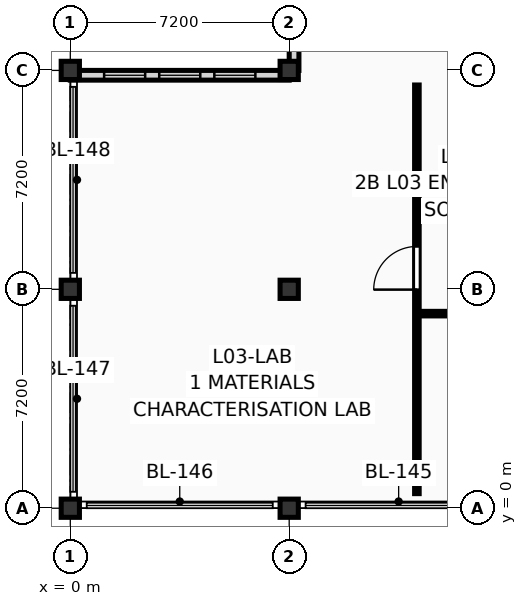
"""IFC4 building model, lengths in metres.
Left out: names, types, materials, properties, quantities, classifications, styles, units other than length and angle.
Written with IfcOpenShell. Run it as: python <this file> out.ifc"""

import sys

from ifc_helpers import new_model, si_unit, direction, frame, frame_2d, origin, origin_2d, place, context, subcontext, project, spatial, rectangle, extrude, element, fill, save


model = new_model("IFC4")
c1 = context("Model", 3, precision=1e-05, world=origin(), true_north=direction((0.0, 1.0)))
c2 = subcontext(c1, "Body", "Model", "MODEL_VIEW")
j1 = project(units=[si_unit("LENGTHUNIT", "METRE"), si_unit("PLANEANGLEUNIT", "RADIAN")], contexts=[c1])
p1 = place(None, origin())
s1 = spatial("IfcSite", under=j1, at=p1, CompositionType="ELEMENT")
p2 = place(p1, origin())
s2 = spatial("IfcBuilding", under=s1, at=p2, CompositionType="ELEMENT")
p3 = place(p2, frame((0.0, 0.0, 12.15)))
s3 = spatial("IfcBuildingStorey", under=s2, at=p3, CompositionType="ELEMENT", Elevation=12.15)
for number, where, z_axis, x_axis in (
    (1, (0.0, 0.0, 0.0), (0.0, 0.0, 1.0), (1.0, 0.0, 0.0)),
    (2, (0.0, 7.2, 0.0), (0.0, 0.0, 1.0), (1.0, 0.0, 0.0)),
    (3, (0.0, 14.4, 0.0), (0.0, 0.0, 1.0), (1.0, 0.0, 0.0)),
    (4, (7.2, 0.0, 0.0), (0.0, 0.0, 1.0), (1.0, 0.0, 0.0)),
    (5, (7.2, 7.2, 0.0), (0.0, 0.0, 1.0), (1.0, 0.0, 0.0)),
    (6, (7.2, 14.4, 0.0), (0.0, 0.0, 1.0), (1.0, 0.0, 0.0)),
):
    element("IfcColumn", number, at=place(p3, frame(where, z_axis=z_axis, x_axis=x_axis)), inside=s3, PredefinedType="COLUMN", context=c2, shape_type="SweptSolid", body=[
        extrude(rectangle(XDim=0.6, YDim=0.6, at=origin_2d()), origin(), (0.0, 0.0, 1.0), 3.6),
    ])
p4 = place(p3, frame((7.36, 14.4, 0.0), z_axis=(0.0, 0.0, 1.0), x_axis=(0.0, 1.0, 0.0)))
e7 = element("IfcWall", 7, at=p4, inside=s3, PredefinedType="SOLIDWALL", context=c2, shape_type="SweptSolid", body=[
    extrude(rectangle(XDim=7.2, YDim=0.32, at=frame_2d((3.6, 0.0))), origin(), (0.0, 0.0, 1.0), 2.84),
])
p5 = place(p4, frame((1.113, 0.0, 0.18)))
e8 = element("IfcOpeningElement", 8, at=p5, cuts=e7, PredefinedType="OPENING", context=c2, shape_type="SweptSolid", body=[
    extrude(rectangle(XDim=1.35, YDim=2.45, at=frame_2d((0.675, 1.225))), frame((0.0, 0.172, 0.0), z_axis=(0.0, -1.0, 0.0), x_axis=(1.0, 0.0, 0.0)), (0.0, 0.0, 1.0), 0.344),
])
p6 = place(p4, frame((2.925, 0.0, 0.18)))
e9 = element("IfcOpeningElement", 9, at=p6, cuts=e7, PredefinedType="OPENING", context=c2, shape_type="SweptSolid", body=[
    extrude(rectangle(XDim=1.35, YDim=2.45, at=frame_2d((0.675, 1.225))), frame((0.0, 0.172, 0.0), z_axis=(0.0, -1.0, 0.0), x_axis=(1.0, 0.0, 0.0)), (0.0, 0.0, 1.0), 0.344),
])
p7 = place(p4, frame((4.738, 0.0, 0.18)))
e10 = element("IfcOpeningElement", 10, at=p7, cuts=e7, PredefinedType="OPENING", context=c2, shape_type="SweptSolid", body=[
    extrude(rectangle(XDim=1.35, YDim=2.45, at=frame_2d((0.675, 1.225))), frame((0.0, 0.172, 0.0), z_axis=(0.0, -1.0, 0.0), x_axis=(1.0, 0.0, 0.0)), (0.0, 0.0, 1.0), 0.344),
])
p8 = place(p3, frame((0.0, 14.24, 0.0), z_axis=(0.0, 0.0, 1.0), x_axis=(1.0, 0.0, 0.0)))
e11 = element("IfcWall", 11, at=p8, inside=s3, PredefinedType="SOLIDWALL", context=c2, shape_type="SweptSolid", body=[
    extrude(rectangle(XDim=7.2, YDim=0.32, at=frame_2d((3.6, 0.0))), origin(), (0.0, 0.0, 1.0), 2.84),
])
p9 = place(p8, frame((1.113, 0.0, 0.18)))
e12 = element("IfcOpeningElement", 12, at=p9, cuts=e11, PredefinedType="OPENING", context=c2, shape_type="SweptSolid", body=[
    extrude(rectangle(XDim=1.35, YDim=2.45, at=frame_2d((0.675, 1.225))), frame((0.0, 0.172, 0.0), z_axis=(0.0, -1.0, 0.0), x_axis=(1.0, 0.0, 0.0)), (0.0, 0.0, 1.0), 0.344),
])
p10 = place(p8, frame((2.925, 0.0, 0.18)))
e13 = element("IfcOpeningElement", 13, at=p10, cuts=e11, PredefinedType="OPENING", context=c2, shape_type="SweptSolid", body=[
    extrude(rectangle(XDim=1.35, YDim=2.45, at=frame_2d((0.675, 1.225))), frame((0.0, 0.172, 0.0), z_axis=(0.0, -1.0, 0.0), x_axis=(1.0, 0.0, 0.0)), (0.0, 0.0, 1.0), 0.344),
])
p11 = place(p8, frame((4.738, 0.0, 0.18)))
e14 = element("IfcOpeningElement", 14, at=p11, cuts=e11, PredefinedType="OPENING", context=c2, shape_type="SweptSolid", body=[
    extrude(rectangle(XDim=1.35, YDim=2.45, at=frame_2d((0.675, 1.225))), frame((0.0, 0.172, 0.0), z_axis=(0.0, -1.0, 0.0), x_axis=(1.0, 0.0, 0.0)), (0.0, 0.0, 1.0), 0.344),
])
p12 = place(p3, frame((11.4, 0.48, 0.0), z_axis=(0.0, 0.0, 1.0), x_axis=(0.0, 1.0, 0.0)))
e15 = element("IfcWall", 15, at=p12, inside=s3, PredefinedType="PARTITIONING", context=c2, shape_type="SweptSolid", body=[
    extrude(rectangle(XDim=13.44, YDim=0.15, at=frame_2d((6.72, 0.0))), origin(), (0.0, 0.0, 1.0), 3.375),
])
p13 = place(p12, frame((6.71, 0.0, 0.0)))
e16 = element("IfcOpeningElement", 16, at=p13, cuts=e15, PredefinedType="OPENING", context=c2, shape_type="SweptSolid", body=[
    extrude(rectangle(XDim=1.42, YDim=2.22, at=frame_2d((0.71, 1.11))), frame((0.0, 0.087, 0.0), z_axis=(0.0, -1.0, 0.0), x_axis=(1.0, 0.0, 0.0)), (0.0, 0.0, 1.0), 0.174),
])
p14 = place(p3, frame((11.515, 6.4, 0.0), z_axis=(0.0, 0.0, 1.0), x_axis=(1.0, 0.0, 0.0)))
e17 = element("IfcWall", 17, at=p14, inside=s3, PredefinedType="PARTITIONING", context=c2, shape_type="SweptSolid", body=[
    extrude(rectangle(XDim=14.405, YDim=0.15, at=frame_2d((7.203, 0.0))), origin(), (0.0, 0.0, 1.0), 3.375),
])
p15 = place(p14, frame((6.492, 0.0, 0.0)))
e18 = element("IfcOpeningElement", 18, at=p15, cuts=e17, PredefinedType="OPENING", context=c2, shape_type="SweptSolid", body=[
    extrude(rectangle(XDim=1.42, YDim=2.22, at=frame_2d((0.71, 1.11))), frame((0.0, 0.087, 0.0), z_axis=(0.0, -1.0, 0.0), x_axis=(1.0, 0.0, 0.0)), (0.0, 0.0, 1.0), 0.174),
])
p16 = place(p9, origin())
e19 = element("IfcWindow", 19, at=p16, inside=s3, PartitioningType="SINGLE_PANEL", PredefinedType="WINDOW", context=c2, shape_type="SweptSolid", body=[
    extrude(rectangle(XDim=1.35, YDim=2.45, at=frame_2d((0.675, 1.225))), frame((0.0, 0.03, 0.0), z_axis=(0.0, -1.0, 0.0), x_axis=(1.0, 0.0, 0.0)), (0.0, 0.0, 1.0), 0.06),
])
fill(e12, e19)
p17 = place(p10, origin())
e20 = element("IfcWindow", 20, at=p17, inside=s3, PartitioningType="SINGLE_PANEL", PredefinedType="WINDOW", context=c2, shape_type="SweptSolid", body=[
    extrude(rectangle(XDim=1.35, YDim=2.45, at=frame_2d((0.675, 1.225))), frame((0.0, 0.03, 0.0), z_axis=(0.0, -1.0, 0.0), x_axis=(1.0, 0.0, 0.0)), (0.0, 0.0, 1.0), 0.06),
])
fill(e13, e20)
p18 = place(p11, origin())
e21 = element("IfcWindow", 21, at=p18, inside=s3, PartitioningType="SINGLE_PANEL", PredefinedType="WINDOW", context=c2, shape_type="SweptSolid", body=[
    extrude(rectangle(XDim=1.35, YDim=2.45, at=frame_2d((0.675, 1.225))), frame((0.0, 0.03, 0.0), z_axis=(0.0, -1.0, 0.0), x_axis=(1.0, 0.0, 0.0)), (0.0, 0.0, 1.0), 0.06),
])
fill(e14, e21)
p19 = place(p13, origin())
e22 = element("IfcDoor", 22, at=p19, inside=s3, OperationType="SINGLE_SWING_LEFT", PredefinedType="DOOR", context=c2, shape_type="SweptSolid", body=[
    extrude(rectangle(XDim=1.42, YDim=2.22, at=frame_2d((0.71, 1.11))), frame((0.0, 0.025, 0.0), z_axis=(0.0, -1.0, 0.0), x_axis=(1.0, 0.0, 0.0)), (0.0, 0.0, 1.0), 0.05),
])
fill(e16, e22)
save(model, sys.argv[1])
